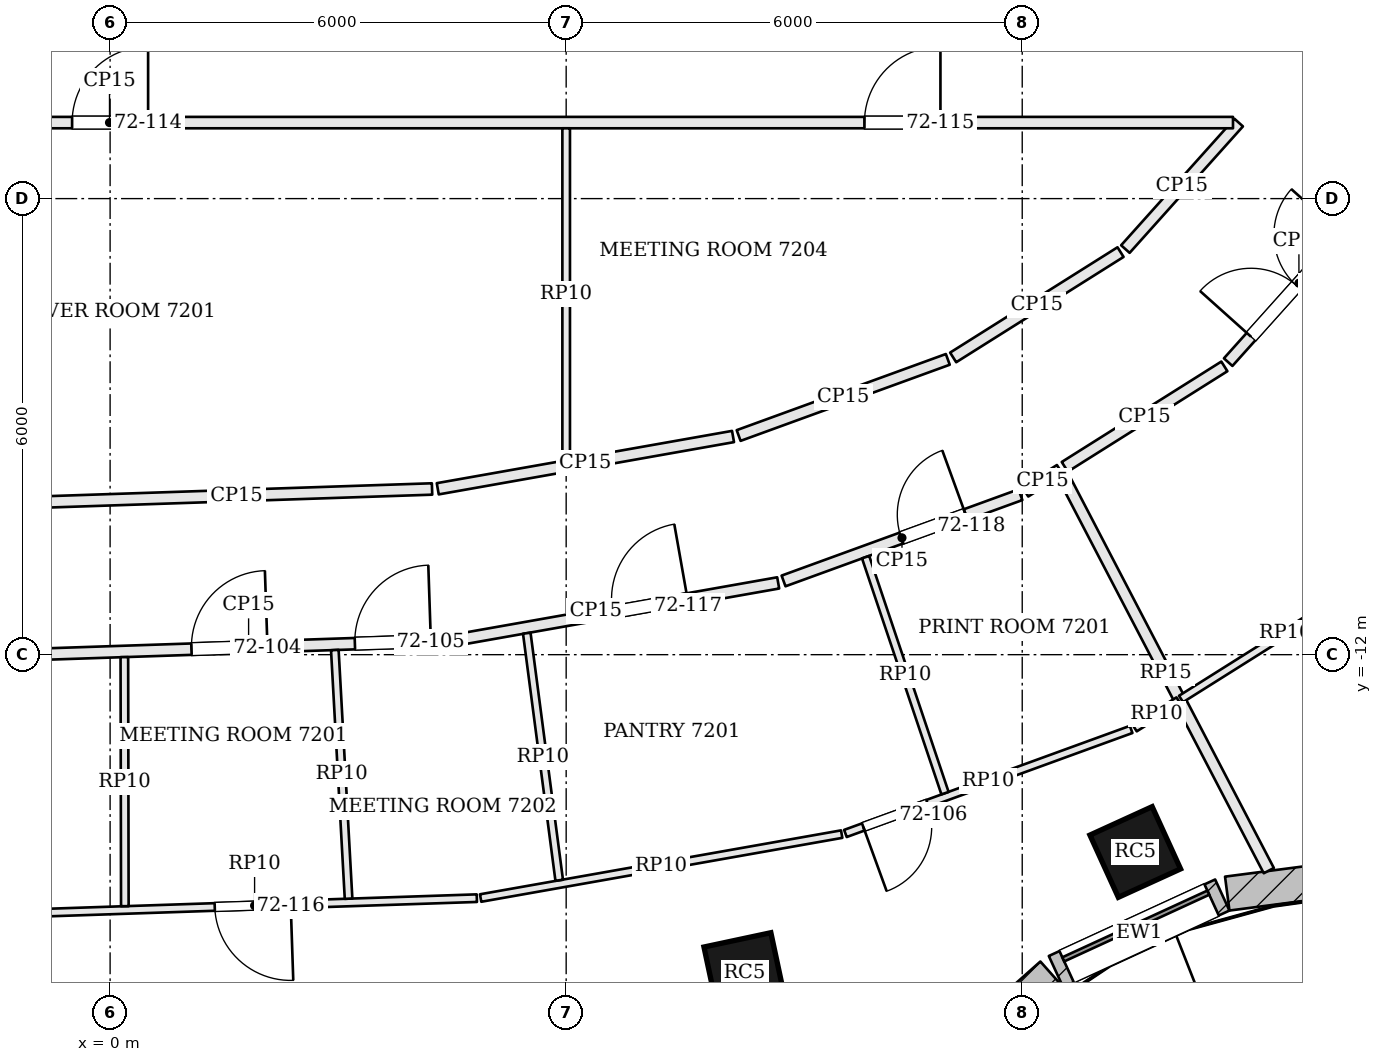
"""IFC4 building model, lengths in metres.
Left out: names, types, materials, properties, quantities, classifications, styles, units other than length and angle.
Written with IfcOpenShell. Run it as: python <this file> out.ifc"""

import sys

from ifc_helpers import new_model, si_unit, direction, frame, frame_2d, origin, origin_2d, place, context, subcontext, project, spatial, rectangle, extrude, element, fill, save


model = new_model("IFC4")
c1 = context("Model", 3, precision=1e-05, world=origin(), true_north=direction((0.0, 1.0)))
c2 = subcontext(c1, "Body", "Model", "MODEL_VIEW")
j1 = project(units=[si_unit("LENGTHUNIT", "METRE"), si_unit("PLANEANGLEUNIT", "RADIAN")], contexts=[c1])
p1 = place(None, origin())
s1 = spatial("IfcSite", under=j1, at=p1, CompositionType="ELEMENT")
p2 = place(p1, origin())
s2 = spatial("IfcBuilding", under=s1, at=p2, CompositionType="ELEMENT")
p3 = place(p2, frame((0.0, 0.0, 292.2)))
s3 = spatial("IfcBuildingStorey", under=s2, at=p3, CompositionType="ELEMENT", Elevation=292.2)
for number, where, z_axis, x_axis in (
    (1, (8.347, -16.192, 0.0), (0.0, 0.0, 1.0), (0.978, 0.209, 0.0)),
    (2, (13.487, -14.596, 0.0), (0.0, 0.0, 1.0), (0.91, 0.415, 0.0)),
):
    element("IfcColumn", number, at=place(p3, frame(where, z_axis=z_axis, x_axis=x_axis)), inside=s3, PredefinedType="COLUMN", context=c2, shape_type="SweptSolid", body=[
        extrude(rectangle(XDim=0.9, YDim=0.9, at=origin_2d()), origin(), (0.0, 0.0, 1.0), 3.9),
    ])
p4 = place(p3, frame((9.21, -19.03, 0.0), z_axis=(0.0, 0.0, 1.0), x_axis=(0.747396648191, 0.664378092861, 0.0)))
e3 = element("IfcWall", 3, at=p4, inside=s3, PredefinedType="SOLIDWALL", context=c2, shape_type="SweptSolid", body=[
    extrude(rectangle(XDim=4.252, YDim=0.45, at=frame_2d((2.126, 0.0))), origin(), (0.0, 0.0, 1.0), 3.7),
])
p5 = place(p4, frame((1.076, 0.0, 0.9)))
e4 = element("IfcOpeningElement", 4, at=p5, cuts=e3, PredefinedType="OPENING", context=c2, shape_type="SweptSolid", body=[
    extrude(rectangle(XDim=2.1, YDim=2.3, at=frame_2d((1.05, 1.15))), frame((0.0, 0.235, 0.0), z_axis=(0.0, -1.0, 0.0), x_axis=(1.0, 0.0, 0.0)), (0.0, 0.0, 1.0), 0.47),
])
p6 = place(p3, frame((12.444, -16.169, 0.0), z_axis=(0.0, 0.0, 1.0), x_axis=(0.908468904074, 0.417952449844, 0.0)))
e5 = element("IfcWall", 5, at=p6, inside=s3, PredefinedType="SOLIDWALL", context=c2, shape_type="SweptSolid", body=[
    extrude(rectangle(XDim=2.409, YDim=0.45, at=frame_2d((1.205, 0.0))), origin(), (0.0, 0.0, 1.0), 3.7),
])
p7 = place(p6, frame((0.155, 0.0, 0.9)))
e6 = element("IfcOpeningElement", 6, at=p7, cuts=e5, PredefinedType="OPENING", context=c2, shape_type="SweptSolid", body=[
    extrude(rectangle(XDim=2.1, YDim=2.3, at=frame_2d((1.05, 1.15))), frame((0.0, 0.235, 0.0), z_axis=(0.0, -1.0, 0.0), x_axis=(1.0, 0.0, 0.0)), (0.0, 0.0, 1.0), 0.47),
])
p8 = place(p3, frame((14.697, -15.143, 0.0), z_axis=(0.0, 0.0, 1.0), x_axis=(0.991631798411, 0.129098320597, 0.0)))
e7 = element("IfcWall", 7, at=p8, inside=s3, PredefinedType="SOLIDWALL", context=c2, shape_type="SweptSolid", body=[
    extrude(rectangle(XDim=5.547, YDim=0.45, at=frame_2d((2.773, 0.0))), origin(), (0.0, 0.0, 1.0), 3.7),
])
p9 = place(p8, frame((1.723, 0.0, 0.9)))
e8 = element("IfcOpeningElement", 8, at=p9, cuts=e7, PredefinedType="OPENING", context=c2, shape_type="SweptSolid", body=[
    extrude(rectangle(XDim=2.1, YDim=2.3, at=frame_2d((1.05, 1.15))), frame((0.0, 0.235, 0.0), z_axis=(0.0, -1.0, 0.0), x_axis=(1.0, 0.0, 0.0)), (0.0, 0.0, 1.0), 0.47),
])
p10 = place(p3, frame((-0.875, -11.993, 0.0), z_axis=(0.0, 0.0, 1.0), x_axis=(0.999436745295, 0.033558786542, 0.0)))
e9 = element("IfcWall", 9, at=p10, inside=s3, PredefinedType="PARTITIONING", context=c2, shape_type="SweptSolid", body=[
    extrude(rectangle(XDim=5.398, YDim=0.15, at=frame_2d((2.699, 0.0))), origin(), (0.0, 0.0, 1.0), 3.198),
])
p11 = place(p10, frame((1.947, 0.0, 0.0)))
e10 = element("IfcOpeningElement", 10, at=p11, cuts=e9, PredefinedType="OPENING", context=c2, shape_type="SweptSolid", body=[
    extrude(rectangle(XDim=1.0, YDim=2.4, at=frame_2d((0.5, 1.2))), frame((0.0, 0.085, 0.0), z_axis=(0.0, -1.0, 0.0), x_axis=(1.0, 0.0, 0.0)), (0.0, 0.0, 1.0), 0.17),
])
p12 = place(p10, frame((4.098, 0.0, 0.0)))
e11 = element("IfcOpeningElement", 11, at=p12, cuts=e9, PredefinedType="OPENING", context=c2, shape_type="SweptSolid", body=[
    extrude(rectangle(XDim=1.0, YDim=2.4, at=frame_2d((0.5, 1.2))), frame((0.0, 0.085, 0.0), z_axis=(0.0, -1.0, 0.0), x_axis=(1.0, 0.0, 0.0)), (0.0, 0.0, 1.0), 0.17),
])
p13 = place(p3, frame((4.594, -11.799, 0.0), z_axis=(0.0, 0.0, 1.0), x_axis=(0.984693444773, 0.174295208833, 0.0)))
e12 = element("IfcWall", 12, at=p13, inside=s3, PredefinedType="PARTITIONING", context=c2, shape_type="SweptSolid", body=[
    extrude(rectangle(XDim=4.261, YDim=0.15, at=frame_2d((2.13, 0.0))), origin(), (0.0, 0.0, 1.0), 3.198),
])
p14 = place(p13, frame((2.05, 0.0, 0.0)))
e13 = element("IfcOpeningElement", 13, at=p14, cuts=e12, PredefinedType="OPENING", context=c2, shape_type="SweptSolid", body=[
    extrude(rectangle(XDim=1.0, YDim=2.1, at=frame_2d((0.5, 1.05))), frame((0.0, 0.085, 0.0), z_axis=(0.0, -1.0, 0.0), x_axis=(1.0, 0.0, 0.0)), (0.0, 0.0, 1.0), 0.17),
])
p15 = place(p3, frame((8.86, -11.03, 0.0), z_axis=(0.0, 0.0, 1.0), x_axis=(0.939685902536, 0.342038601001, 0.0)))
e14 = element("IfcWall", 14, at=p15, inside=s3, PredefinedType="PARTITIONING", context=c2, shape_type="SweptSolid", body=[
    extrude(rectangle(XDim=3.316, YDim=0.15, at=frame_2d((1.658, 0.0))), origin(), (0.0, 0.0, 1.0), 3.198),
])
p16 = place(p15, frame((1.65, 0.0, 0.0)))
e15 = element("IfcOpeningElement", 15, at=p16, cuts=e14, PredefinedType="OPENING", context=c2, shape_type="SweptSolid", body=[
    extrude(rectangle(XDim=0.9, YDim=2.1, at=frame_2d((0.45, 1.05))), frame((0.0, 0.085, 0.0), z_axis=(0.0, -1.0, 0.0), x_axis=(1.0, 0.0, 0.0)), (0.0, 0.0, 1.0), 0.17),
])
p17 = place(p3, frame((12.04, -9.856, 0.0), z_axis=(0.0, 0.0, 1.0), x_axis=(0.846240393033, 0.532801273647, 0.0)))
e16 = element("IfcWall", 16, at=p17, inside=s3, PredefinedType="PARTITIONING", context=c2, shape_type="SweptSolid", body=[
    extrude(rectangle(XDim=0.54, YDim=0.15, at=frame_2d((0.27, 0.0))), origin(), (0.0, 0.0, 1.0), 3.198),
])
p18 = place(p3, frame((15.244, -14.841, 0.0), z_axis=(0.0, 0.0, 1.0), x_axis=(-0.462122511499, 0.886816093881, 0.0)))
e17 = element("IfcWall", 17, at=p18, inside=s3, PredefinedType="PARTITIONING", context=c2, shape_type="SweptSolid", body=[
    extrude(rectangle(XDim=5.871, YDim=0.15, at=frame_2d((2.935, 0.0))), origin(), (0.0, 0.0, 1.0), 3.234),
])
p19 = place(p3, frame((12.56, -9.529, 0.0), z_axis=(0.0, 0.0, 1.0), x_axis=(0.846402081662, 0.53254437952, 0.0)))
e18 = element("IfcWall", 18, at=p19, inside=s3, PredefinedType="PARTITIONING", context=c2, shape_type="SweptSolid", body=[
    extrude(rectangle(XDim=2.481, YDim=0.15, at=frame_2d((1.24, 0.0))), origin(), (0.0, 0.0, 1.0), 3.198),
])
p20 = place(p3, frame((14.709, -8.152, 0.0), z_axis=(0.0, 0.0, 1.0), x_axis=(0.667275630306, 0.744810870758, 0.0)))
e19 = element("IfcWall", 19, at=p20, inside=s3, PredefinedType="PARTITIONING", context=c2, shape_type="SweptSolid", body=[
    extrude(rectangle(XDim=2.79, YDim=0.15, at=frame_2d((1.395, 0.0))), origin(), (0.0, 0.0, 1.0), 3.198),
])
p21 = place(p20, frame((0.45, 0.0, 0.0)))
e20 = element("IfcOpeningElement", 20, at=p21, cuts=e19, PredefinedType="OPENING", context=c2, shape_type="SweptSolid", body=[
    extrude(rectangle(XDim=1.8, YDim=2.1, at=frame_2d((0.9, 1.05))), frame((0.0, 0.085, 0.0), z_axis=(0.0, -1.0, 0.0), x_axis=(1.0, 0.0, 0.0)), (0.0, 0.0, 1.0), 0.17),
])
p22 = place(p3, frame((14.848, -5.0, 0.0), z_axis=(0.0, 0.0, 1.0), x_axis=(-0.667363249373, -0.744732363595, 0.0)))
e21 = element("IfcWall", 21, at=p22, inside=s3, PredefinedType="PARTITIONING", context=c2, shape_type="SweptSolid", body=[
    extrude(rectangle(XDim=2.234, YDim=0.15, at=frame_2d((1.117, 0.0))), origin(), (0.0, 0.0, 1.0), 3.198),
])
p23 = place(p3, frame((13.293, -6.704, 0.0), z_axis=(0.0, 0.0, 1.0), x_axis=(-0.84641299998, -0.532527026041, 0.0)))
e22 = element("IfcWall", 22, at=p23, inside=s3, PredefinedType="PARTITIONING", context=c2, shape_type="SweptSolid", body=[
    extrude(rectangle(XDim=2.602, YDim=0.15, at=frame_2d((1.301, 0.0))), origin(), (0.0, 0.0, 1.0), 3.198),
])
p24 = place(p3, frame((11.021, -8.115, 0.0), z_axis=(0.0, 0.0, 1.0), x_axis=(-0.939683845313, -0.342044252778, 0.0)))
e23 = element("IfcWall", 23, at=p24, inside=s3, PredefinedType="PARTITIONING", context=c2, shape_type="SweptSolid", body=[
    extrude(rectangle(XDim=2.929, YDim=0.15, at=frame_2d((1.464, 0.0))), origin(), (0.0, 0.0, 1.0), 3.198),
])
p25 = place(p3, frame((8.195, -9.13, 0.0), z_axis=(0.0, 0.0, 1.0), x_axis=(-0.9846880937, -0.174325437403, 0.0)))
e24 = element("IfcWall", 24, at=p25, inside=s3, PredefinedType="PARTITIONING", context=c2, shape_type="SweptSolid", body=[
    extrude(rectangle(XDim=3.945, YDim=0.15, at=frame_2d((1.973, 0.0))), origin(), (0.0, 0.0, 1.0), 3.198),
])
p26 = place(p3, frame((4.236, -9.82, 0.0), z_axis=(0.0, 0.0, 1.0), x_axis=(-0.999435760561, -0.033588100749, 0.0)))
e25 = element("IfcWall", 25, at=p26, inside=s3, PredefinedType="PARTITIONING", context=c2, shape_type="SweptSolid", body=[
    extrude(rectangle(XDim=5.146, YDim=0.15, at=frame_2d((2.573, 0.0))), origin(), (0.0, 0.0, 1.0), 3.198),
])
p27 = place(p3, frame((-14.789, -5.0, 0.0), z_axis=(0.0, 0.0, 1.0), x_axis=(1.0, 0.0, 0.0)))
e26 = element("IfcWall", 26, at=p27, inside=s3, PredefinedType="PARTITIONING", context=c2, shape_type="SweptSolid", body=[
    extrude(rectangle(XDim=29.562, YDim=0.15, at=frame_2d((14.781, 0.0))), origin(), (0.0, 0.0, 1.0), 3.198),
])
p28 = place(p27, frame((3.857, 0.0, 0.0)))
e27 = element("IfcOpeningElement", 27, at=p28, cuts=e26, PredefinedType="OPENING", context=c2, shape_type="SweptSolid", body=[
    extrude(rectangle(XDim=1.0, YDim=2.4, at=frame_2d((0.5, 1.2))), frame((0.0, 0.085, 0.0), z_axis=(0.0, -1.0, 0.0), x_axis=(1.0, 0.0, 0.0)), (0.0, 0.0, 1.0), 0.17),
])
p29 = place(p27, frame((14.289, 0.0, 0.0)))
e28 = element("IfcOpeningElement", 28, at=p29, cuts=e26, PredefinedType="OPENING", context=c2, shape_type="SweptSolid", body=[
    extrude(rectangle(XDim=1.0, YDim=2.1, at=frame_2d((0.5, 1.05))), frame((0.0, 0.085, 0.0), z_axis=(0.0, -1.0, 0.0), x_axis=(1.0, 0.0, 0.0)), (0.0, 0.0, 1.0), 0.17),
])
p30 = place(p27, frame((24.713, 0.0, 0.0)))
e29 = element("IfcOpeningElement", 29, at=p30, cuts=e26, PredefinedType="OPENING", context=c2, shape_type="SweptSolid", body=[
    extrude(rectangle(XDim=1.0, YDim=2.4, at=frame_2d((0.5, 1.2))), frame((0.0, 0.085, 0.0), z_axis=(0.0, -1.0, 0.0), x_axis=(1.0, 0.0, 0.0)), (0.0, 0.0, 1.0), 0.17),
])
p31 = place(p3, frame((14.056, -12.604, 0.0), z_axis=(0.0, 0.0, 1.0), x_axis=(-0.846544184051, -0.532318461496, 0.0)))
e30 = element("IfcWall", 30, at=p31, inside=s3, PredefinedType="PARTITIONING", context=c2, shape_type="SweptSolid", body=[
    extrude(rectangle(XDim=0.681, YDim=0.1, at=frame_2d((0.34, 0.0))), origin(), (0.0, 0.0, 1.0), 3.198),
])
p32 = place(p3, frame((13.433, -12.984, 0.0), z_axis=(0.0, 0.0, 1.0), x_axis=(-0.939673979614, -0.342071355182, 0.0)))
e31 = element("IfcWall", 31, at=p32, inside=s3, PredefinedType="PARTITIONING", context=c2, shape_type="SweptSolid", body=[
    extrude(rectangle(XDim=4.0, YDim=0.1, at=frame_2d((2.0, 0.0))), origin(), (0.0, 0.0, 1.0), 3.198),
])
p33 = place(p32, frame((2.85, 0.0, 0.0)))
e32 = element("IfcOpeningElement", 32, at=p33, cuts=e31, PredefinedType="OPENING", context=c2, shape_type="SweptSolid", body=[
    extrude(rectangle(XDim=0.9, YDim=2.1, at=frame_2d((0.45, 1.05))), frame((0.0, 0.06, 0.0), z_axis=(0.0, -1.0, 0.0), x_axis=(1.0, 0.0, 0.0)), (0.0, 0.0, 1.0), 0.12),
])
p34 = place(p3, frame((9.625, -14.361, 0.0), z_axis=(0.0, 0.0, 1.0), x_axis=(-0.984691710098, -0.174305008716, 0.0)))
e33 = element("IfcWall", 33, at=p34, inside=s3, PredefinedType="PARTITIONING", context=c2, shape_type="SweptSolid", body=[
    extrude(rectangle(XDim=4.824, YDim=0.1, at=frame_2d((2.412, 0.0))), origin(), (0.0, 0.0, 1.0), 3.198),
])
p35 = place(p3, frame((4.825, -15.203, 0.0), z_axis=(0.0, 0.0, 1.0), x_axis=(-0.999435699456, -0.033589918924, 0.0)))
e34 = element("IfcWall", 34, at=p35, inside=s3, PredefinedType="PARTITIONING", context=c2, shape_type="SweptSolid", body=[
    extrude(rectangle(XDim=5.851, YDim=0.1, at=frame_2d((2.926, 0.0))), origin(), (0.0, 0.0, 1.0), 3.198),
])
p36 = place(p35, frame((2.45, 0.0, 0.0)))
e35 = element("IfcOpeningElement", 35, at=p36, cuts=e34, PredefinedType="OPENING", context=c2, shape_type="SweptSolid", body=[
    extrude(rectangle(XDim=1.0, YDim=2.4, at=frame_2d((0.5, 1.2))), frame((0.0, 0.06, 0.0), z_axis=(0.0, -1.0, 0.0), x_axis=(1.0, 0.0, 0.0)), (0.0, 0.0, 1.0), 0.12),
])
p37 = place(p3, frame((0.188, -12.032, 0.0), z_axis=(0.0, 0.0, 1.0), x_axis=(0.001937258864, -0.999998123512, 0.0)))
e36 = element("IfcWall", 36, at=p37, inside=s3, PredefinedType="PARTITIONING", context=c2, shape_type="SweptSolid", body=[
    extrude(rectangle(XDim=3.277, YDim=0.1, at=frame_2d((1.638, 0.0))), origin(), (0.0, 0.0, 1.0), 3.198),
])
p38 = place(p3, frame((2.956, -11.939, 0.0), z_axis=(0.0, 0.0, 1.0), x_axis=(0.055226477976, -0.998473853504, 0.0)))
e37 = element("IfcWall", 37, at=p38, inside=s3, PredefinedType="PARTITIONING", context=c2, shape_type="SweptSolid", body=[
    extrude(rectangle(XDim=3.276, YDim=0.1, at=frame_2d((1.638, 0.0))), origin(), (0.0, 0.0, 1.0), 3.198),
])
p39 = place(p3, frame((5.482, -11.718, 0.0), z_axis=(0.0, 0.0, 1.0), x_axis=(0.130173255727, -0.991491262439, 0.0)))
e38 = element("IfcWall", 38, at=p39, inside=s3, PredefinedType="PARTITIONING", context=c2, shape_type="SweptSolid", body=[
    extrude(rectangle(XDim=3.278, YDim=0.1, at=frame_2d((1.639, 0.0))), origin(), (0.0, 0.0, 1.0), 3.198),
])
p40 = place(p3, frame((9.94, -10.717, 0.0), z_axis=(0.0, 0.0, 1.0), x_axis=(0.318730603816, -0.947845347191, 0.0)))
e39 = element("IfcWall", 39, at=p40, inside=s3, PredefinedType="PARTITIONING", context=c2, shape_type="SweptSolid", body=[
    extrude(rectangle(XDim=3.276, YDim=0.1, at=frame_2d((1.638, 0.0))), origin(), (0.0, 0.0, 1.0), 3.198),
])
p41 = place(p3, frame((16.831, -10.858, 0.0), z_axis=(0.0, 0.0, 1.0), x_axis=(-0.846427876971, -0.532503379413, 0.0)))
e40 = element("IfcWall", 40, at=p41, inside=s3, PredefinedType="PARTITIONING", context=c2, shape_type="SweptSolid", body=[
    extrude(rectangle(XDim=3.239, YDim=0.1, at=frame_2d((1.62, 0.0))), origin(), (0.0, 0.0, 1.0), 3.198),
])
p42 = place(p3, frame((6.0, -9.444, 0.0), z_axis=(0.0, 0.0, 1.0), x_axis=(0.0, 1.0, 0.0)))
e41 = element("IfcWall", 41, at=p42, inside=s3, PredefinedType="PARTITIONING", context=c2, shape_type="SweptSolid", body=[
    extrude(rectangle(XDim=4.369, YDim=0.1, at=frame_2d((2.184, 0.0))), origin(), (0.0, 0.0, 1.0), 3.198),
])
p43 = place(p7, origin())
e42 = element("IfcWindow", 42, at=p43, inside=s3, PartitioningType="SINGLE_PANEL", PredefinedType="WINDOW", context=c2, shape_type="SweptSolid", body=[
    extrude(rectangle(XDim=2.1, YDim=2.3, at=frame_2d((1.05, 1.15))), frame((0.0, 0.135, 0.0), z_axis=(0.0, -1.0, 0.0), x_axis=(1.0, 0.0, 0.0)), (0.0, 0.0, 1.0), 0.06),
])
fill(e6, e42)
p44 = place(p11, origin())
e43 = element("IfcDoor", 43, at=p44, inside=s3, OperationType="SINGLE_SWING_RIGHT", PredefinedType="DOOR", context=c2, shape_type="SweptSolid", body=[
    extrude(rectangle(XDim=1.0, YDim=2.4, at=frame_2d((0.5, 1.2))), frame((0.0, 0.025, 0.0), z_axis=(0.0, -1.0, 0.0), x_axis=(1.0, 0.0, 0.0)), (0.0, 0.0, 1.0), 0.05),
])
fill(e10, e43)
p45 = place(p12, origin())
e44 = element("IfcDoor", 44, at=p45, inside=s3, OperationType="SINGLE_SWING_RIGHT", PredefinedType="DOOR", context=c2, shape_type="SweptSolid", body=[
    extrude(rectangle(XDim=1.0, YDim=2.4, at=frame_2d((0.5, 1.2))), frame((0.0, 0.025, 0.0), z_axis=(0.0, -1.0, 0.0), x_axis=(1.0, 0.0, 0.0)), (0.0, 0.0, 1.0), 0.05),
])
fill(e11, e44)
p46 = place(p33, origin())
e45 = element("IfcDoor", 45, at=p46, inside=s3, OperationType="SINGLE_SWING_RIGHT", PredefinedType="DOOR", context=c2, shape_type="SweptSolid", body=[
    extrude(rectangle(XDim=0.9, YDim=2.1, at=frame_2d((0.45, 1.05))), frame((0.0, 0.025, 0.0), z_axis=(0.0, -1.0, 0.0), x_axis=(1.0, 0.0, 0.0)), (0.0, 0.0, 1.0), 0.05),
])
fill(e32, e45)
p47 = place(p21, origin())
e46 = element("IfcDoor", 46, at=p47, inside=s3, OperationType="DOUBLE_DOOR_SINGLE_SWING", PredefinedType="DOOR", context=c2, shape_type="SweptSolid", body=[
    extrude(rectangle(XDim=1.8, YDim=2.1, at=frame_2d((0.9, 1.05))), frame((0.0, 0.025, 0.0), z_axis=(0.0, -1.0, 0.0), x_axis=(1.0, 0.0, 0.0)), (0.0, 0.0, 1.0), 0.05),
])
fill(e20, e46)
p48 = place(p29, origin())
e47 = element("IfcDoor", 47, at=p48, inside=s3, OperationType="SINGLE_SWING_RIGHT", PredefinedType="DOOR", context=c2, shape_type="SweptSolid", body=[
    extrude(rectangle(XDim=1.0, YDim=2.1, at=frame_2d((0.5, 1.05))), frame((0.0, 0.025, 0.0), z_axis=(0.0, -1.0, 0.0), x_axis=(1.0, 0.0, 0.0)), (0.0, 0.0, 1.0), 0.05),
])
fill(e28, e47)
p49 = place(p30, origin())
e48 = element("IfcDoor", 48, at=p49, inside=s3, OperationType="SINGLE_SWING_RIGHT", PredefinedType="DOOR", context=c2, shape_type="SweptSolid", body=[
    extrude(rectangle(XDim=1.0, YDim=2.4, at=frame_2d((0.5, 1.2))), frame((0.0, 0.025, 0.0), z_axis=(0.0, -1.0, 0.0), x_axis=(1.0, 0.0, 0.0)), (0.0, 0.0, 1.0), 0.05),
])
fill(e29, e48)
p50 = place(p36, origin())
e49 = element("IfcDoor", 49, at=p50, inside=s3, OperationType="SINGLE_SWING_LEFT", PredefinedType="DOOR", context=c2, shape_type="SweptSolid", body=[
    extrude(rectangle(XDim=1.0, YDim=2.4, at=frame_2d((0.5, 1.2))), frame((0.0, 0.025, 0.0), z_axis=(0.0, -1.0, 0.0), x_axis=(1.0, 0.0, 0.0)), (0.0, 0.0, 1.0), 0.05),
])
fill(e35, e49)
p51 = place(p14, origin())
e50 = element("IfcDoor", 50, at=p51, inside=s3, OperationType="SINGLE_SWING_RIGHT", PredefinedType="DOOR", context=c2, shape_type="SweptSolid", body=[
    extrude(rectangle(XDim=1.0, YDim=2.1, at=frame_2d((0.5, 1.05))), frame((0.0, 0.025, 0.0), z_axis=(0.0, -1.0, 0.0), x_axis=(1.0, 0.0, 0.0)), (0.0, 0.0, 1.0), 0.05),
])
fill(e13, e50)
p52 = place(p16, origin())
e51 = element("IfcDoor", 51, at=p52, inside=s3, OperationType="SINGLE_SWING_RIGHT", PredefinedType="DOOR", context=c2, shape_type="SweptSolid", body=[
    extrude(rectangle(XDim=0.9, YDim=2.1, at=frame_2d((0.45, 1.05))), frame((0.0, 0.025, 0.0), z_axis=(0.0, -1.0, 0.0), x_axis=(1.0, 0.0, 0.0)), (0.0, 0.0, 1.0), 0.05),
])
fill(e15, e51)
save(model, sys.argv[1])
